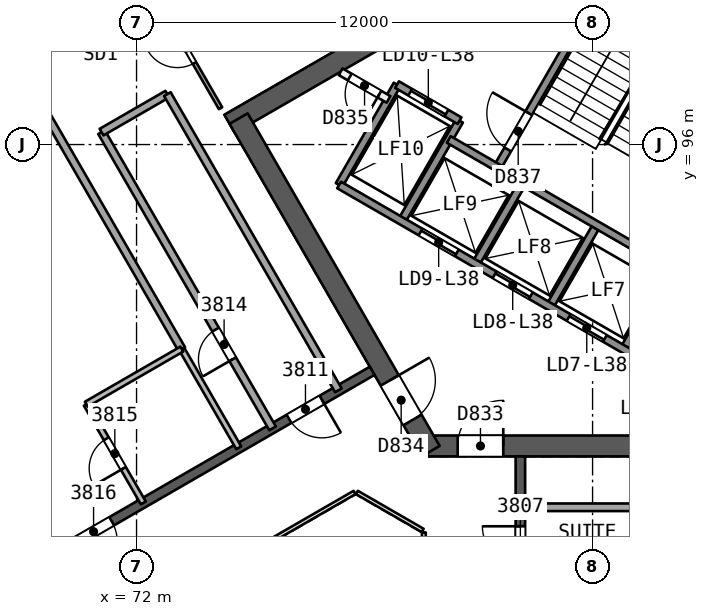
"""IFC4 building model, lengths in metres.
Left out: names, types, materials, properties, quantities, classifications, styles, units other than length and angle.
Written with IfcOpenShell. Run it as: python <this file> out.ifc"""

import sys

from ifc_helpers import new_model, si_unit, direction, frame, frame_2d, origin, place, context, subcontext, project, spatial, rectangle, extrude, element, fill, save


model = new_model("IFC4")
c1 = context("Model", 3, precision=1e-05, world=origin(), true_north=direction((0.0, 1.0)))
c2 = subcontext(c1, "Body", "Model", "MODEL_VIEW")
j1 = project(units=[si_unit("LENGTHUNIT", "METRE"), si_unit("PLANEANGLEUNIT", "RADIAN")], contexts=[c1])
p1 = place(None, origin())
s1 = spatial("IfcSite", under=j1, at=p1, CompositionType="ELEMENT")
p2 = place(p1, origin())
s2 = spatial("IfcBuilding", under=s1, at=p2, CompositionType="ELEMENT")
p3 = place(p2, frame((0.0, 0.0, 160.0)))
s3 = spatial("IfcBuildingStorey", under=s2, at=p3, CompositionType="ELEMENT", Elevation=160.0)
p4 = place(p3, frame((79.659, 88.069, 0.0), z_axis=(0.0, 0.0, 1.0), x_axis=(1.0, 0.0, 0.0)))
e1 = element("IfcWall", 1, at=p4, inside=s3, PredefinedType="SHEAR", context=c2, shape_type="SweptSolid", body=[
    extrude(rectangle(XDim=10.221, YDim=0.55, at=frame_2d((5.111, 0.0))), origin(), (0.0, 0.0, 1.0), 3.7),
])
p5 = place(p4, frame((0.791, 0.0, 0.0)))
e2 = element("IfcOpeningElement", 2, at=p5, cuts=e1, PredefinedType="OPENING", context=c2, shape_type="SweptSolid", body=[
    extrude(rectangle(XDim=1.2, YDim=2.1, at=frame_2d((0.6, 1.05))), frame((0.0, 0.286, 0.0), z_axis=(0.0, -1.0, 0.0), x_axis=(1.0, 0.0, 0.0)), (0.0, 0.0, 1.0), 0.571),
])
p6 = place(p3, frame((86.723, 103.633, 0.0), z_axis=(0.0, 0.0, 1.0), x_axis=(-0.866023530946, -0.500003243837, 0.0)))
e3 = element("IfcWall", 3, at=p6, inside=s3, PredefinedType="SHEAR", context=c2, shape_type="SweptSolid", body=[
    extrude(rectangle(XDim=14.175, YDim=0.55, at=frame_2d((7.087, 0.0))), origin(), (0.0, 0.0, 1.0), 3.7),
])
p7 = place(p3, frame((74.686, 96.683, 0.0), z_axis=(0.0, 0.0, 1.0), x_axis=(0.499997818338, -0.866026663364, 0.0)))
e4 = element("IfcWall", 4, at=p7, inside=s3, PredefinedType="SHEAR", context=c2, shape_type="SweptSolid", body=[
    extrude(rectangle(XDim=10.105, YDim=0.55, at=frame_2d((5.052, 0.0))), origin(), (0.0, 0.0, 1.0), 3.7),
])
p8 = place(p7, frame((7.955, 0.0, 0.0)))
e5 = element("IfcOpeningElement", 5, at=p8, cuts=e4, PredefinedType="OPENING", context=c2, shape_type="SweptSolid", body=[
    extrude(rectangle(XDim=1.2, YDim=2.1, at=frame_2d((0.6, 1.05))), frame((0.0, 0.286, 0.0), z_axis=(0.0, -1.0, 0.0), x_axis=(1.0, 0.0, 0.0)), (0.0, 0.0, 1.0), 0.571),
])
p9 = place(p3, frame((82.1, 72.206, 0.0), z_axis=(0.0, 0.0, 1.0), x_axis=(0.0, 1.0, 0.0)))
e6 = element("IfcWall", 6, at=p9, inside=s3, PredefinedType="SHEAR", context=c2, shape_type="SweptSolid", body=[
    extrude(rectangle(XDim=15.588, YDim=0.25, at=frame_2d((7.794, 0.0))), origin(), (0.0, 0.0, 1.0), 3.25),
])
p10 = place(p9, frame((2.306, 0.0, 0.0)))
e7 = element("IfcOpeningElement", 7, at=p10, cuts=e6, PredefinedType="OPENING", context=c2, shape_type="SweptSolid", body=[
    extrude(rectangle(XDim=1.0, YDim=2.1, at=frame_2d((0.5, 1.05))), frame((0.0, 0.135, 0.0), z_axis=(0.0, -1.0, 0.0), x_axis=(1.0, 0.0, 0.0)), (0.0, 0.0, 1.0), 0.271),
])
p11 = place(p9, frame((9.162, 0.0, 0.0)))
e8 = element("IfcOpeningElement", 8, at=p11, cuts=e6, PredefinedType="OPENING", context=c2, shape_type="SweptSolid", body=[
    extrude(rectangle(XDim=1.1, YDim=2.1, at=frame_2d((0.55, 1.05))), frame((0.0, 0.135, 0.0), z_axis=(0.0, -1.0, 0.0), x_axis=(1.0, 0.0, 0.0)), (0.0, 0.0, 1.0), 0.271),
])
p12 = place(p9, frame((12.75, 0.0, 0.0)))
e9 = element("IfcOpeningElement", 9, at=p12, cuts=e6, PredefinedType="OPENING", context=c2, shape_type="SweptSolid", body=[
    extrude(rectangle(XDim=1.0, YDim=2.1, at=frame_2d((0.5, 1.05))), frame((0.0, 0.135, 0.0), z_axis=(0.0, -1.0, 0.0), x_axis=(1.0, 0.0, 0.0)), (0.0, 0.0, 1.0), 0.271),
])
p13 = place(p3, frame((78.2, 90.046, 0.0), z_axis=(0.0, 0.0, 1.0), x_axis=(-0.866026492143, -0.499998114903, 0.0)))
e10 = element("IfcWall", 10, at=p13, inside=s3, PredefinedType="SHEAR", context=c2, shape_type="SweptSolid", body=[
    extrude(rectangle(XDim=15.588, YDim=0.25, at=frame_2d((7.794, 0.0))), origin(), (0.0, 0.0, 1.0), 3.25),
])
p14 = place(p13, frame((1.527, 0.0, 0.0)))
e11 = element("IfcOpeningElement", 11, at=p14, cuts=e10, PredefinedType="OPENING", context=c2, shape_type="SweptSolid", body=[
    extrude(rectangle(XDim=1.0, YDim=2.1, at=frame_2d((0.5, 1.05))), frame((0.0, 0.135, 0.0), z_axis=(0.0, -1.0, 0.0), x_axis=(1.0, 0.0, 0.0)), (0.0, 0.0, 1.0), 0.271),
])
p15 = place(p13, frame((7.915, 0.0, 0.0)))
e12 = element("IfcOpeningElement", 12, at=p15, cuts=e10, PredefinedType="OPENING", context=c2, shape_type="SweptSolid", body=[
    extrude(rectangle(XDim=1.1, YDim=2.1, at=frame_2d((0.55, 1.05))), frame((0.0, 0.135, 0.0), z_axis=(0.0, -1.0, 0.0), x_axis=(1.0, 0.0, 0.0)), (0.0, 0.0, 1.0), 0.271),
])
p16 = place(p13, frame((10.982, 0.0, 0.0)))
e13 = element("IfcOpeningElement", 13, at=p16, cuts=e10, PredefinedType="OPENING", context=c2, shape_type="SweptSolid", body=[
    extrude(rectangle(XDim=1.0, YDim=2.1, at=frame_2d((0.5, 1.05))), frame((0.0, 0.135, 0.0), z_axis=(0.0, -1.0, 0.0), x_axis=(1.0, 0.0, 0.0)), (0.0, 0.0, 1.0), 0.271),
])
p17 = place(p3, frame((82.1, 86.456, 0.0), z_axis=(0.0, 0.0, 1.0), x_axis=(1.0, 0.0, 0.0)))
e14 = element("IfcWall", 14, at=p17, inside=s3, PredefinedType="PARTITIONING", context=c2, shape_type="SweptSolid", body=[
    extrude(rectangle(XDim=9.0, YDim=0.2, at=frame_2d((4.5, 0.0))), origin(), (0.0, 0.0, 1.0), 3.25),
])
p18 = place(p17, frame((4.05, 0.0, 0.0)))
e15 = element("IfcOpeningElement", 15, at=p18, cuts=e14, PredefinedType="OPENING", context=c2, shape_type="SweptSolid", body=[
    extrude(rectangle(XDim=0.9, YDim=2.1, at=frame_2d((0.45, 1.05))), frame((0.0, 0.11, 0.0), z_axis=(0.0, -1.0, 0.0), x_axis=(1.0, 0.0, 0.0)), (0.0, 0.0, 1.0), 0.221),
])
p19 = place(p3, frame((74.21, 96.956, 0.0), z_axis=(0.0, 0.0, 1.0), x_axis=(-0.499983176524, 0.866035116605, 0.0)))
e16 = element("IfcWall", 16, at=p19, inside=s3, PredefinedType="PARTITIONING", context=c2, shape_type="SweptSolid", body=[
    extrude(rectangle(XDim=3.648, YDim=0.1, at=frame_2d((1.824, 0.0))), origin(), (0.0, 0.0, 1.0), 3.25),
])
p20 = place(p19, frame((1.374, 0.0, 0.0)))
e17 = element("IfcOpeningElement", 17, at=p20, cuts=e16, PredefinedType="OPENING", context=c2, shape_type="SweptSolid", body=[
    extrude(rectangle(XDim=0.9, YDim=2.1, at=frame_2d((0.45, 1.05))), frame((0.0, 0.061, 0.0), z_axis=(0.0, -1.0, 0.0), x_axis=(1.0, 0.0, 0.0)), (0.0, 0.0, 1.0), 0.121),
])
p21 = place(p3, frame((75.579, 88.533, 0.0), z_axis=(0.0, 0.0, 1.0), x_axis=(-0.5000018851, 0.866024315419, 0.0)))
e18 = element("IfcWall", 18, at=p21, inside=s3, PredefinedType="PARTITIONING", context=c2, shape_type="SweptSolid", body=[
    extrude(rectangle(XDim=9.0, YDim=0.2, at=frame_2d((4.5, 0.0))), origin(), (0.0, 0.0, 1.0), 3.25),
])
p22 = place(p21, frame((2.1, 0.0, 0.0)))
e19 = element("IfcOpeningElement", 19, at=p22, cuts=e18, PredefinedType="OPENING", context=c2, shape_type="SweptSolid", body=[
    extrude(rectangle(XDim=0.9, YDim=2.1, at=frame_2d((0.45, 1.05))), frame((0.0, 0.11, 0.0), z_axis=(0.0, -1.0, 0.0), x_axis=(1.0, 0.0, 0.0)), (0.0, 0.0, 1.0), 0.221),
])
p23 = place(p3, frame((71.079, 96.327, 0.0), z_axis=(0.0, 0.0, 1.0), x_axis=(0.866041268327, 0.499972520799, 0.0)))
e20 = element("IfcWall", 20, at=p23, inside=s3, PredefinedType="PARTITIONING", context=c2, shape_type="SweptSolid", body=[
    extrude(rectangle(XDim=2.0, YDim=0.2, at=frame_2d((1.0, 0.0))), origin(), (0.0, 0.0, 1.0), 3.25),
])
p24 = place(p3, frame((72.811, 97.327, 0.0), z_axis=(0.0, 0.0, 1.0), x_axis=(0.5000018851, -0.866024315419, 0.0)))
e21 = element("IfcWall", 21, at=p24, inside=s3, PredefinedType="PARTITIONING", context=c2, shape_type="SweptSolid", body=[
    extrude(rectangle(XDim=9.0, YDim=0.2, at=frame_2d((4.5, 0.0))), origin(), (0.0, 0.0, 1.0), 3.25),
])
p25 = place(p3, frame((68.877, 98.088, 0.0), z_axis=(0.0, 0.0, 1.0), x_axis=(0.500001735503, -0.866024401789, 0.0)))
e22 = element("IfcWall", 22, at=p25, inside=s3, PredefinedType="PARTITIONING", context=c2, shape_type="SweptSolid", body=[
    extrude(rectangle(XDim=8.626, YDim=0.2, at=frame_2d((4.313, 0.0))), origin(), (0.0, 0.0, 1.0), 3.25),
])
p26 = place(p3, frame((73.19, 90.617, 0.0), z_axis=(0.0, 0.0, 1.0), x_axis=(0.499990139034, -0.866031096941, 0.0)))
e23 = element("IfcWall", 23, at=p26, inside=s3, PredefinedType="PARTITIONING", context=c2, shape_type="SweptSolid", body=[
    extrude(rectangle(XDim=3.0, YDim=0.15, at=frame_2d((1.5, 0.0))), origin(), (0.0, 0.0, 1.0), 3.25),
])
p27 = place(p3, frame((72.178, 86.569, 0.0), z_axis=(0.0, 0.0, 1.0), x_axis=(-0.499990139034, 0.866031096941, 0.0)))
e24 = element("IfcWall", 24, at=p27, inside=s3, PredefinedType="PARTITIONING", context=c2, shape_type="SweptSolid", body=[
    extrude(rectangle(XDim=3.0, YDim=0.15, at=frame_2d((1.5, 0.0))), origin(), (0.0, 0.0, 1.0), 3.25),
])
p28 = place(p27, frame((1.05, 0.0, 0.0)))
e25 = element("IfcOpeningElement", 25, at=p28, cuts=e24, PredefinedType="OPENING", context=c2, shape_type="SweptSolid", body=[
    extrude(rectangle(XDim=0.9, YDim=2.1, at=frame_2d((0.45, 1.05))), frame((0.0, 0.085, 0.0), z_axis=(0.0, -1.0, 0.0), x_axis=(1.0, 0.0, 0.0)), (0.0, 0.0, 1.0), 0.171),
])
p29 = place(p3, frame((70.678, 89.167, 0.0), z_axis=(0.0, 0.0, 1.0), x_axis=(0.866032775405, 0.499987231761, 0.0)))
e26 = element("IfcWall", 26, at=p29, inside=s3, PredefinedType="PARTITIONING", context=c2, shape_type="SweptSolid", body=[
    extrude(rectangle(XDim=2.9, YDim=0.15, at=frame_2d((1.45, 0.0))), origin(), (0.0, 0.0, 1.0), 3.25),
])
p30 = place(p3, frame((42.059, 82.777, 0.0), z_axis=(0.0, 0.0, 1.0), x_axis=(0.866025745652, 0.499999407868, 0.0)))
e27 = element("IfcWall", 27, at=p30, inside=s3, PredefinedType="SOLIDWALL", context=c2, shape_type="SweptSolid", body=[
    extrude(rectangle(XDim=54.279, YDim=0.3, at=frame_2d((27.14, 0.0))), origin(), (0.0, 0.0, 1.0), 3.25),
])
p31 = place(p30, frame((26.719, 0.0, 0.0)))
e28 = element("IfcOpeningElement", 28, at=p31, cuts=e27, PredefinedType="OPENING", context=c2, shape_type="SweptSolid", body=[
    extrude(rectangle(XDim=2.4, YDim=2.4, at=frame_2d((1.2, 1.2))), frame((0.0, 0.161, 0.0), z_axis=(0.0, -1.0, 0.0), x_axis=(1.0, 0.0, 0.0)), (0.0, 0.0, 1.0), 0.321),
])
p32 = place(p30, frame((31.708, 0.0, 0.0)))
e29 = element("IfcOpeningElement", 29, at=p32, cuts=e27, PredefinedType="OPENING", context=c2, shape_type="SweptSolid", body=[
    extrude(rectangle(XDim=2.4, YDim=2.4, at=frame_2d((1.2, 1.2))), frame((0.0, 0.161, 0.0), z_axis=(0.0, -1.0, 0.0), x_axis=(1.0, 0.0, 0.0)), (0.0, 0.0, 1.0), 0.321),
])
p33 = place(p30, frame((42.175, 0.0, 0.0)))
e30 = element("IfcOpeningElement", 30, at=p33, cuts=e27, PredefinedType="OPENING", context=c2, shape_type="SweptSolid", body=[
    extrude(rectangle(XDim=2.4, YDim=2.4, at=frame_2d((1.2, 1.2))), frame((0.0, 0.161, 0.0), z_axis=(0.0, -1.0, 0.0), x_axis=(1.0, 0.0, 0.0)), (0.0, 0.0, 1.0), 0.321),
])
p34 = place(p30, frame((11.235, 0.0, 0.0)))
e31 = element("IfcOpeningElement", 31, at=p34, cuts=e27, PredefinedType="OPENING", context=c2, shape_type="SweptSolid", body=[
    extrude(rectangle(XDim=2.4, YDim=2.4, at=frame_2d((1.2, 1.2))), frame((0.0, 0.161, 0.0), z_axis=(0.0, -1.0, 0.0), x_axis=(1.0, 0.0, 0.0)), (0.0, 0.0, 1.0), 0.321),
])
for number, where, z_axis, x_axis in (
    (32, (84.821, 90.611, 0.0), (0.0, 0.0, 1.0), (0.5, 0.866, 0.0)),
    (33, (82.873, 91.736, 0.0), (0.0, 0.0, 1.0), (0.5, 0.866, 0.0)),
    (34, (80.924, 92.861, 0.0), (0.0, 0.0, 1.0), (0.5, 0.866, 0.0)),
):
    element("IfcWall", number, at=place(p3, frame(where, z_axis=z_axis, x_axis=x_axis)), inside=s3, PredefinedType="SOLIDWALL", context=c2, shape_type="SweptSolid", body=[
        extrude(rectangle(XDim=2.48, YDim=0.2, at=frame_2d((1.24, 0.0))), origin(), (0.0, 0.0, 1.0), 3.25),
    ])
p35 = place(p3, frame((81.493, 95.396, 0.0), z_axis=(0.0, 0.0, 1.0), x_axis=(0.500006057782, 0.866021906294, 0.0)))
e35 = element("IfcWall", 35, at=p35, inside=s3, PredefinedType="SOLIDWALL", context=c2, shape_type="SweptSolid", body=[
    extrude(rectangle(XDim=7.7, YDim=0.2, at=frame_2d((3.85, 0.0))), origin(), (0.0, 0.0, 1.0), 3.25),
])
p36 = place(p35, frame((0.55, 0.0, 0.0)))
e36 = element("IfcOpeningElement", 36, at=p36, cuts=e35, PredefinedType="OPENING", context=c2, shape_type="SweptSolid", body=[
    extrude(rectangle(XDim=1.1, YDim=2.1, at=frame_2d((0.55, 1.05))), frame((0.0, 0.11, 0.0), z_axis=(0.0, -1.0, 0.0), x_axis=(1.0, 0.0, 0.0)), (0.0, 0.0, 1.0), 0.221),
])
for number, where, z_axis, x_axis in (
    (37, (78.976, 93.986, 0.0), (0.0, 0.0, 1.0), (0.5, 0.866, 0.0)),
    (38, (77.33, 94.936, 0.0), (0.0, 0.0, 1.0), (0.5, 0.866, 0.0)),
):
    element("IfcWall", number, at=place(p3, frame(where, z_axis=z_axis, x_axis=x_axis)), inside=s3, PredefinedType="SOLIDWALL", context=c2, shape_type="SweptSolid", body=[
        extrude(rectangle(XDim=3.05, YDim=0.2, at=frame_2d((1.525, 0.0))), origin(), (0.0, 0.0, 1.0), 3.25),
    ])
p37 = place(p3, frame((86.77, 89.486, 0.0), z_axis=(0.0, 0.0, 1.0), x_axis=(-0.86601811187, 0.500012629753, 0.0)))
e39 = element("IfcWall", 39, at=p37, inside=s3, PredefinedType="SOLIDWALL", context=c2, shape_type="SweptSolid", body=[
    extrude(rectangle(XDim=10.9, YDim=0.2, at=frame_2d((5.45, 0.0))), origin(), (0.0, 0.0, 1.0), 3.25),
])
p38 = place(p37, frame((0.575, 0.0, 0.0)))
e40 = element("IfcOpeningElement", 40, at=p38, cuts=e39, PredefinedType="OPENING", context=c2, shape_type="SweptSolid", body=[
    extrude(rectangle(XDim=1.1, YDim=2.1, at=frame_2d((0.55, 1.05))), frame((0.0, 0.11, 0.0), z_axis=(0.0, -1.0, 0.0), x_axis=(1.0, 0.0, 0.0)), (0.0, 0.0, 1.0), 0.221),
])
p39 = place(p37, frame((2.825, 0.0, 0.0)))
e41 = element("IfcOpeningElement", 41, at=p39, cuts=e39, PredefinedType="OPENING", context=c2, shape_type="SweptSolid", body=[
    extrude(rectangle(XDim=1.1, YDim=2.1, at=frame_2d((0.55, 1.05))), frame((0.0, 0.11, 0.0), z_axis=(0.0, -1.0, 0.0), x_axis=(1.0, 0.0, 0.0)), (0.0, 0.0, 1.0), 0.221),
])
p40 = place(p37, frame((5.075, 0.0, 0.0)))
e42 = element("IfcOpeningElement", 42, at=p40, cuts=e39, PredefinedType="OPENING", context=c2, shape_type="SweptSolid", body=[
    extrude(rectangle(XDim=1.1, YDim=2.1, at=frame_2d((0.55, 1.05))), frame((0.0, 0.11, 0.0), z_axis=(0.0, -1.0, 0.0), x_axis=(1.0, 0.0, 0.0)), (0.0, 0.0, 1.0), 0.221),
])
p41 = place(p37, frame((7.325, 0.0, 0.0)))
e43 = element("IfcOpeningElement", 43, at=p41, cuts=e39, PredefinedType="OPENING", context=c2, shape_type="SweptSolid", body=[
    extrude(rectangle(XDim=1.1, YDim=2.1, at=frame_2d((0.55, 1.05))), frame((0.0, 0.11, 0.0), z_axis=(0.0, -1.0, 0.0), x_axis=(1.0, 0.0, 0.0)), (0.0, 0.0, 1.0), 0.221),
])
p42 = place(p3, frame((89.33, 90.872, 0.0), z_axis=(0.0, 0.0, 1.0), x_axis=(-0.866027589512, 0.49999621419, 0.0)))
e44 = element("IfcWall", 44, at=p42, inside=s3, PredefinedType="SOLIDWALL", context=c2, shape_type="SweptSolid", body=[
    extrude(rectangle(XDim=10.524, YDim=0.2, at=frame_2d((5.262, 0.0))), origin(), (0.0, 0.0, 1.0), 3.25),
])
p43 = place(p42, frame((0.312, 0.0, 0.0)))
e45 = element("IfcOpeningElement", 45, at=p43, cuts=e44, PredefinedType="OPENING", context=c2, shape_type="SweptSolid", body=[
    extrude(rectangle(XDim=0.9, YDim=2.1, at=frame_2d((0.45, 1.05))), frame((0.0, 0.11, 0.0), z_axis=(0.0, -1.0, 0.0), x_axis=(1.0, 0.0, 0.0)), (0.0, 0.0, 1.0), 0.221),
])
p44 = place(p3, frame((78.63, 97.188, 0.0), z_axis=(0.0, 0.0, 1.0), x_axis=(-0.866003949776, 0.500037157592, 0.0)))
e46 = element("IfcWall", 46, at=p44, inside=s3, PredefinedType="PARTITIONING", context=c2, shape_type="SweptSolid", body=[
    extrude(rectangle(XDim=1.455, YDim=0.2, at=frame_2d((0.728, 0.0))), origin(), (0.0, 0.0, 1.0), 3.25),
])
p45 = place(p44, frame((0.278, 0.0, 0.0)))
e47 = element("IfcOpeningElement", 47, at=p45, cuts=e46, PredefinedType="OPENING", context=c2, shape_type="SweptSolid", body=[
    extrude(rectangle(XDim=0.9, YDim=2.1, at=frame_2d((0.45, 1.05))), frame((0.0, 0.11, 0.0), z_axis=(0.0, -1.0, 0.0), x_axis=(1.0, 0.0, 0.0)), (0.0, 0.0, 1.0), 0.221),
])
p46 = place(p3, frame((80.5, 96.627, 0.0), z_axis=(0.0, 0.0, 1.0), x_axis=(-0.86601224135, 0.500022797313, 0.0)))
e48 = element("IfcWall", 48, at=p46, inside=s3, PredefinedType="SOLIDWALL", context=c2, shape_type="SweptSolid", body=[
    extrude(rectangle(XDim=1.9, YDim=0.2, at=frame_2d((0.95, 0.0))), origin(), (0.0, 0.0, 1.0), 3.25),
])
p47 = place(p46, frame((0.4, 0.0, 0.0)))
e49 = element("IfcOpeningElement", 49, at=p47, cuts=e48, PredefinedType="OPENING", context=c2, shape_type="SweptSolid", body=[
    extrude(rectangle(XDim=1.1, YDim=2.1, at=frame_2d((0.55, 1.05))), frame((0.0, 0.11, 0.0), z_axis=(0.0, -1.0, 0.0), x_axis=(1.0, 0.0, 0.0)), (0.0, 0.0, 1.0), 0.221),
])
p48 = place(p3, frame((79.56, 74.206, 0.0), z_axis=(0.0, 0.0, 1.0), x_axis=(0.0, 1.0, 0.0)))
e50 = element("IfcWall", 50, at=p48, inside=s3, PredefinedType="PARTITIONING", context=c2, shape_type="SweptSolid", body=[
    extrude(rectangle(XDim=11.588, YDim=0.1, at=frame_2d((5.794, 0.0))), origin(), (0.0, 0.0, 1.0), 3.25),
])
p49 = place(p3, frame((79.53, 85.846, 0.0), z_axis=(0.0, 0.0, 1.0), x_axis=(-0.866041268327, 0.499972520799, 0.0)))
e51 = element("IfcWall", 51, at=p49, inside=s3, PredefinedType="PARTITIONING", context=c2, shape_type="SweptSolid", body=[
    extrude(rectangle(XDim=2.0, YDim=0.1, at=frame_2d((1.0, 0.0))), origin(), (0.0, 0.0, 1.0), 3.25),
])
p50 = place(p3, frame((77.738, 86.846, 0.0), z_axis=(0.0, 0.0, 1.0), x_axis=(-0.866026658274, -0.499997827154, 0.0)))
e52 = element("IfcWall", 52, at=p50, inside=s3, PredefinedType="PARTITIONING", context=c2, shape_type="SweptSolid", body=[
    extrude(rectangle(XDim=11.588, YDim=0.1, at=frame_2d((5.794, 0.0))), origin(), (0.0, 0.0, 1.0), 3.25),
])
p51 = place(p12, origin())
e53 = element("IfcDoor", 53, at=p51, inside=s3, OperationType="SINGLE_SWING_RIGHT", PredefinedType="NOTDEFINED", context=c2, shape_type="SweptSolid", body=[
    extrude(rectangle(XDim=1.0, YDim=2.1, at=frame_2d((0.5, 1.05))), frame((0.0, 0.025, 0.0), z_axis=(0.0, -1.0, 0.0), x_axis=(1.0, 0.0, 0.0)), (0.0, 0.0, 1.0), 0.05),
])
fill(e9, e53)
p52 = place(p14, origin())
e54 = element("IfcDoor", 54, at=p52, inside=s3, OperationType="SINGLE_SWING_LEFT", PredefinedType="NOTDEFINED", context=c2, shape_type="SweptSolid", body=[
    extrude(rectangle(XDim=1.0, YDim=2.1, at=frame_2d((0.5, 1.05))), frame((0.0, 0.025, 0.0), z_axis=(0.0, -1.0, 0.0), x_axis=(1.0, 0.0, 0.0)), (0.0, 0.0, 1.0), 0.05),
])
fill(e11, e54)
p53 = place(p20, origin())
e55 = element("IfcDoor", 55, at=p53, inside=s3, OperationType="SINGLE_SWING_RIGHT", PredefinedType="NOTDEFINED", context=c2, shape_type="SweptSolid", body=[
    extrude(rectangle(XDim=0.9, YDim=2.1, at=frame_2d((0.45, 1.05))), frame((0.0, 0.025, 0.0), z_axis=(0.0, -1.0, 0.0), x_axis=(1.0, 0.0, 0.0)), (0.0, 0.0, 1.0), 0.05),
])
fill(e17, e55)
p54 = place(p22, origin())
e56 = element("IfcDoor", 56, at=p54, inside=s3, OperationType="SINGLE_SWING_LEFT", PredefinedType="NOTDEFINED", context=c2, shape_type="SweptSolid", body=[
    extrude(rectangle(XDim=0.9, YDim=2.1, at=frame_2d((0.45, 1.05))), frame((0.0, 0.025, 0.0), z_axis=(0.0, -1.0, 0.0), x_axis=(1.0, 0.0, 0.0)), (0.0, 0.0, 1.0), 0.05),
])
fill(e19, e56)
p55 = place(p28, origin())
e57 = element("IfcDoor", 57, at=p55, inside=s3, OperationType="SINGLE_SWING_LEFT", PredefinedType="NOTDEFINED", context=c2, shape_type="SweptSolid", body=[
    extrude(rectangle(XDim=0.9, YDim=2.1, at=frame_2d((0.45, 1.05))), frame((0.0, 0.025, 0.0), z_axis=(0.0, -1.0, 0.0), x_axis=(1.0, 0.0, 0.0)), (0.0, 0.0, 1.0), 0.05),
])
fill(e25, e57)
p56 = place(p15, origin())
e58 = element("IfcDoor", 58, at=p56, inside=s3, OperationType="SINGLE_SWING_RIGHT", PredefinedType="NOTDEFINED", context=c2, shape_type="SweptSolid", body=[
    extrude(rectangle(XDim=1.1, YDim=2.1, at=frame_2d((0.55, 1.05))), frame((0.0, 0.025, 0.0), z_axis=(0.0, -1.0, 0.0), x_axis=(1.0, 0.0, 0.0)), (0.0, 0.0, 1.0), 0.05),
])
fill(e12, e58)
p57 = place(p5, origin())
e59 = element("IfcDoor", 59, at=p57, inside=s3, OperationType="SINGLE_SWING_RIGHT", PredefinedType="NOTDEFINED", context=c2, shape_type="SweptSolid", body=[
    extrude(rectangle(XDim=1.2, YDim=2.1, at=frame_2d((0.6, 1.05))), frame((0.0, 0.025, 0.0), z_axis=(0.0, -1.0, 0.0), x_axis=(1.0, 0.0, 0.0)), (0.0, 0.0, 1.0), 0.05),
])
fill(e2, e59)
p58 = place(p8, origin())
e60 = element("IfcDoor", 60, at=p58, inside=s3, OperationType="SINGLE_SWING_LEFT", PredefinedType="NOTDEFINED", context=c2, shape_type="SweptSolid", body=[
    extrude(rectangle(XDim=1.2, YDim=2.1, at=frame_2d((0.6, 1.05))), frame((0.0, 0.025, 0.0), z_axis=(0.0, -1.0, 0.0), x_axis=(1.0, 0.0, 0.0)), (0.0, 0.0, 1.0), 0.05),
])
fill(e5, e60)
p59 = place(p39, origin())
e61 = element("IfcDoor", 61, at=p59, inside=s3, OperationType="SLIDING_TO_LEFT", PredefinedType="NOTDEFINED", context=c2, shape_type="SweptSolid", body=[
    extrude(rectangle(XDim=1.1, YDim=2.1, at=frame_2d((0.55, 1.05))), frame((0.0, 0.025, 0.0), z_axis=(0.0, -1.0, 0.0), x_axis=(1.0, 0.0, 0.0)), (0.0, 0.0, 1.0), 0.05),
])
fill(e41, e61)
p60 = place(p40, origin())
e62 = element("IfcDoor", 62, at=p60, inside=s3, OperationType="SLIDING_TO_RIGHT", PredefinedType="NOTDEFINED", context=c2, shape_type="SweptSolid", body=[
    extrude(rectangle(XDim=1.1, YDim=2.1, at=frame_2d((0.55, 1.05))), frame((0.0, 0.025, 0.0), z_axis=(0.0, -1.0, 0.0), x_axis=(1.0, 0.0, 0.0)), (0.0, 0.0, 1.0), 0.05),
])
fill(e42, e62)
p61 = place(p41, origin())
e63 = element("IfcDoor", 63, at=p61, inside=s3, OperationType="SLIDING_TO_LEFT", PredefinedType="NOTDEFINED", context=c2, shape_type="SweptSolid", body=[
    extrude(rectangle(XDim=1.1, YDim=2.1, at=frame_2d((0.55, 1.05))), frame((0.0, 0.025, 0.0), z_axis=(0.0, -1.0, 0.0), x_axis=(1.0, 0.0, 0.0)), (0.0, 0.0, 1.0), 0.05),
])
fill(e43, e63)
p62 = place(p47, origin())
e64 = element("IfcDoor", 64, at=p62, inside=s3, OperationType="SLIDING_TO_RIGHT", PredefinedType="NOTDEFINED", context=c2, shape_type="SweptSolid", body=[
    extrude(rectangle(XDim=1.1, YDim=2.1, at=frame_2d((0.55, 1.05))), frame((0.0, 0.025, 0.0), z_axis=(0.0, -1.0, 0.0), x_axis=(1.0, 0.0, 0.0)), (0.0, 0.0, 1.0), 0.05),
])
fill(e49, e64)
p63 = place(p45, origin())
e65 = element("IfcDoor", 65, at=p63, inside=s3, OperationType="SINGLE_SWING_LEFT", PredefinedType="NOTDEFINED", context=c2, shape_type="SweptSolid", body=[
    extrude(rectangle(XDim=0.9, YDim=2.1, at=frame_2d((0.45, 1.05))), frame((0.0, 0.025, 0.0), z_axis=(0.0, -1.0, 0.0), x_axis=(1.0, 0.0, 0.0)), (0.0, 0.0, 1.0), 0.05),
])
fill(e47, e65)
p64 = place(p36, origin())
e66 = element("IfcDoor", 66, at=p64, inside=s3, OperationType="SINGLE_SWING_RIGHT", PredefinedType="NOTDEFINED", context=c2, shape_type="SweptSolid", body=[
    extrude(rectangle(XDim=1.1, YDim=2.1, at=frame_2d((0.55, 1.05))), frame((0.0, 0.025, 0.0), z_axis=(0.0, -1.0, 0.0), x_axis=(1.0, 0.0, 0.0)), (0.0, 0.0, 1.0), 0.05),
])
fill(e36, e66)
save(model, sys.argv[1])
